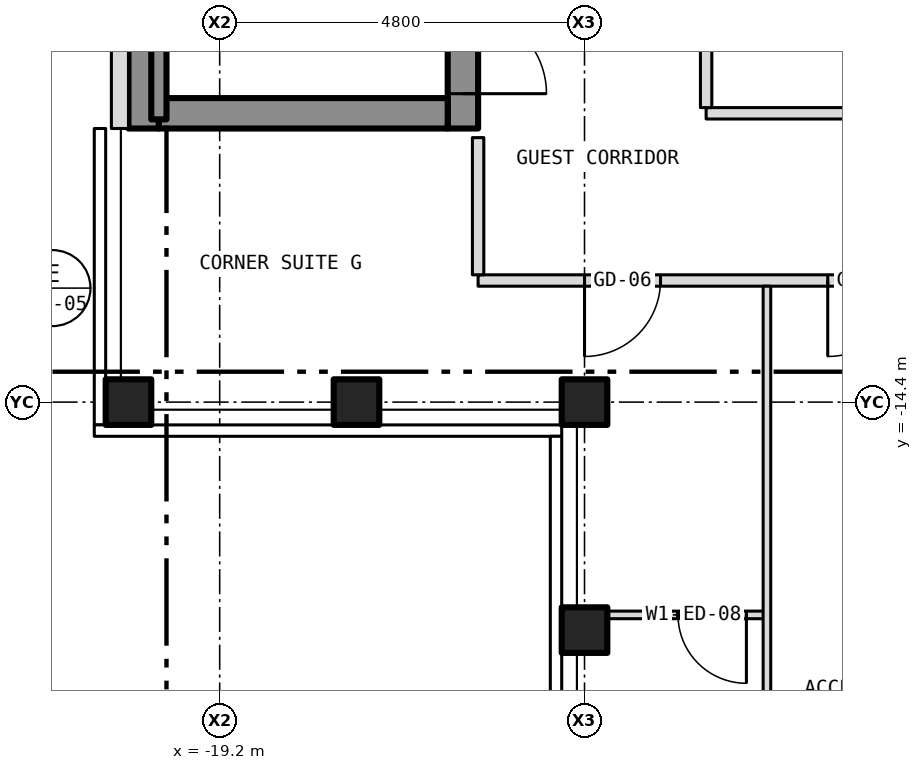
"""IFC4 building model, lengths in metres.
Left out: names, types, materials, properties, quantities, classifications, styles, units other than length and angle.
Written with IfcOpenShell. Run it as: python <this file> out.ifc"""

import sys

from ifc_helpers import new_model, si_unit, direction, frame, frame_2d, origin, origin_2d, place, context, subcontext, project, spatial, rectangle, hollow_rectangle, extrude, element, fill, save


model = new_model("IFC4")
c1 = context("Model", 3, precision=1e-05, world=origin(), true_north=direction((0.0, 1.0)))
c2 = subcontext(c1, "Body", "Model", "MODEL_VIEW")
j1 = project(units=[si_unit("LENGTHUNIT", "METRE"), si_unit("PLANEANGLEUNIT", "RADIAN")], contexts=[c1])
p1 = place(None, origin())
s1 = spatial("IfcSite", under=j1, at=p1, CompositionType="ELEMENT")
p2 = place(p1, origin())
s2 = spatial("IfcBuilding", under=s1, at=p2, CompositionType="ELEMENT")
p3 = place(p2, frame((0.0, 0.0, 241.0)))
s3 = spatial("IfcBuildingStorey", under=s2, at=p3, CompositionType="ELEMENT", Elevation=241.0)
for number, where, z_axis, x_axis in (
    (1, (-20.4, -14.4, -0.15), (0.0, 0.0, 1.0), (1.0, 0.0, 0.0)),
    (2, (-14.4, -14.4, -0.15), (0.0, 0.0, 1.0), (1.0, 0.0, 0.0)),
    (3, (-14.4, -17.4, -0.15), (0.0, 0.0, 1.0), (1.0, 0.0, 0.0)),
    (4, (-17.4, -14.4, -0.15), (0.0, 0.0, 1.0), (1.0, 0.0, 0.0)),
):
    element("IfcColumn", number, at=place(p3, frame(where, z_axis=z_axis, x_axis=x_axis)), inside=s3, PredefinedType="COLUMN", context=c2, shape_type="SweptSolid", body=[
        extrude(hollow_rectangle(XDim=0.6, YDim=0.6, WallThickness=0.03, at=origin_2d()), origin(), (0.0, 0.0, 1.0), 3.5),
    ])
p4 = place(p3, frame((-16.0, -10.8, 0.0), z_axis=(0.0, 0.0, 1.0), x_axis=(0.0, 1.0, 0.0)))
e5 = element("IfcWall", 5, at=p4, inside=s3, PredefinedType="SHEAR", context=c2, shape_type="SweptSolid", body=[
    extrude(rectangle(XDim=21.6, YDim=0.4, at=frame_2d((10.8, 0.0))), origin(), (0.0, 0.0, 1.0), 3.25),
])
p5 = place(p4, frame((9.4, 0.0, 0.0)))
e6 = element("IfcOpeningElement", 6, at=p5, cuts=e5, PredefinedType="OPENING", context=c2, shape_type="SweptSolid", body=[
    extrude(rectangle(XDim=1.1, YDim=2.1, at=frame_2d((0.55, 1.05))), frame((0.0, 0.212, 0.0), z_axis=(0.0, -1.0, 0.0), x_axis=(1.0, 0.0, 0.0)), (0.0, 0.0, 1.0), 0.424),
])
p6 = place(p4, frame((11.5, 0.0, 0.0)))
e7 = element("IfcOpeningElement", 7, at=p6, cuts=e5, PredefinedType="OPENING", context=c2, shape_type="SweptSolid", body=[
    extrude(rectangle(XDim=1.1, YDim=2.1, at=frame_2d((0.55, 1.05))), frame((0.0, 0.212, 0.0), z_axis=(0.0, -1.0, 0.0), x_axis=(1.0, 0.0, 0.0)), (0.0, 0.0, 1.0), 0.424),
])
p7 = place(p4, frame((13.6, 0.0, 0.0)))
e8 = element("IfcOpeningElement", 8, at=p7, cuts=e5, PredefinedType="OPENING", context=c2, shape_type="SweptSolid", body=[
    extrude(rectangle(XDim=1.1, YDim=2.1, at=frame_2d((0.55, 1.05))), frame((0.0, 0.212, 0.0), z_axis=(0.0, -1.0, 0.0), x_axis=(1.0, 0.0, 0.0)), (0.0, 0.0, 1.0), 0.424),
])
p8 = place(p4, frame((15.7, 0.0, 0.0)))
e9 = element("IfcOpeningElement", 9, at=p8, cuts=e5, PredefinedType="OPENING", context=c2, shape_type="SweptSolid", body=[
    extrude(rectangle(XDim=1.1, YDim=2.1, at=frame_2d((0.55, 1.05))), frame((0.0, 0.212, 0.0), z_axis=(0.0, -1.0, 0.0), x_axis=(1.0, 0.0, 0.0)), (0.0, 0.0, 1.0), 0.424),
])
p9 = place(p4, frame((17.8, 0.0, 0.0)))
e10 = element("IfcOpeningElement", 10, at=p9, cuts=e5, PredefinedType="OPENING", context=c2, shape_type="SweptSolid", body=[
    extrude(rectangle(XDim=1.1, YDim=2.1, at=frame_2d((0.55, 1.05))), frame((0.0, 0.212, 0.0), z_axis=(0.0, -1.0, 0.0), x_axis=(1.0, 0.0, 0.0)), (0.0, 0.0, 1.0), 0.424),
])
p10 = place(p4, frame((0.458, 0.0, 0.0)))
e11 = element("IfcOpeningElement", 11, at=p10, cuts=e5, PredefinedType="OPENING", context=c2, shape_type="SweptSolid", body=[
    extrude(rectangle(XDim=1.1, YDim=2.1, at=frame_2d((0.55, 1.05))), frame((0.0, 0.212, 0.0), z_axis=(0.0, -1.0, 0.0), x_axis=(1.0, 0.0, 0.0)), (0.0, 0.0, 1.0), 0.424),
])
p11 = place(p4, frame((7.5, 0.0, 0.0)))
e12 = element("IfcOpeningElement", 12, at=p11, cuts=e5, PredefinedType="OPENING", context=c2, shape_type="SweptSolid", body=[
    extrude(rectangle(XDim=1.1, YDim=2.1, at=frame_2d((0.55, 1.05))), frame((0.0, 0.212, 0.0), z_axis=(0.0, -1.0, 0.0), x_axis=(1.0, 0.0, 0.0)), (0.0, 0.0, 1.0), 0.424),
])
p12 = place(p4, frame((20.0, 0.0, 0.0)))
e13 = element("IfcOpeningElement", 13, at=p12, cuts=e5, PredefinedType="OPENING", context=c2, shape_type="SweptSolid", body=[
    extrude(rectangle(XDim=0.9, YDim=2.1, at=frame_2d((0.45, 1.05))), frame((0.0, 0.212, 0.0), z_axis=(0.0, -1.0, 0.0), x_axis=(1.0, 0.0, 0.0)), (0.0, 0.0, 1.0), 0.424),
])
p13 = place(p3, frame((-20.2, -10.8, 0.0), z_axis=(0.0, 0.0, 1.0), x_axis=(0.0, 1.0, 0.0)))
e14 = element("IfcWall", 14, at=p13, inside=s3, PredefinedType="SHEAR", context=c2, shape_type="SweptSolid", body=[
    extrude(rectangle(XDim=21.6, YDim=0.4, at=frame_2d((10.8, 0.0))), origin(), (0.0, 0.0, 1.0), 3.25),
])
p14 = place(p3, frame((-20.0, -10.6, 0.0), z_axis=(0.0, 0.0, 1.0), x_axis=(1.0, 0.0, 0.0)))
e15 = element("IfcWall", 15, at=p14, inside=s3, PredefinedType="SHEAR", context=c2, shape_type="SweptSolid", body=[
    extrude(rectangle(XDim=3.8, YDim=0.4, at=frame_2d((1.9, 0.0))), origin(), (0.0, 0.0, 1.0), 3.25),
])
p15 = place(p3, frame((-20.512, 10.8, 0.0), z_axis=(0.0, 0.0, 1.0), x_axis=(0.0, -1.0, 0.0)))
e16 = element("IfcWall", 16, at=p15, inside=s3, PredefinedType="SOLIDWALL", context=c2, shape_type="SweptSolid", body=[
    extrude(rectangle(XDim=21.6, YDim=0.225, at=frame_2d((10.8, 0.0))), origin(), (0.0, 0.0, 1.0), 3.5),
])
p16 = place(p15, frame((18.05, 0.0, 1.0)))
e17 = element("IfcOpeningElement", 17, at=p16, cuts=e16, PredefinedType="OPENING", context=c2, shape_type="SweptSolid", body=[
    extrude(rectangle(XDim=0.6, YDim=1.5, at=frame_2d((0.3, 0.75))), frame((0.0, 0.125, 0.0), z_axis=(0.0, -1.0, 0.0), x_axis=(1.0, 0.0, 0.0)), (0.0, 0.0, 1.0), 0.249),
])
p17 = place(p3, frame((-14.28, -17.2, 0.0), z_axis=(0.0, 0.0, 1.0), x_axis=(1.0, 0.0, 0.0)))
e18 = element("IfcWall", 18, at=p17, inside=s3, PredefinedType="PARTITIONING", context=c2, shape_type="SweptSolid", body=[
    extrude(rectangle(XDim=2.28, YDim=0.1, at=frame_2d((1.14, 0.0))), origin(), (0.0, 0.0, 1.0), 3.35),
])
p18 = place(p17, frame((1.11, 0.0, 0.0)))
e19 = element("IfcOpeningElement", 19, at=p18, cuts=e18, PredefinedType="OPENING", context=c2, shape_type="SweptSolid", body=[
    extrude(rectangle(XDim=0.9, YDim=2.1, at=frame_2d((0.45, 1.05))), frame((0.0, 0.062, 0.0), z_axis=(0.0, -1.0, 0.0), x_axis=(1.0, 0.0, 0.0)), (0.0, 0.0, 1.0), 0.124),
])
p19 = place(p3, frame((-15.8, -12.8, 0.0), z_axis=(0.0, 0.0, 1.0), x_axis=(1.0, 0.0, 0.0)))
e20 = element("IfcWall", 20, at=p19, inside=s3, PredefinedType="PARTITIONING", context=c2, shape_type="SweptSolid", body=[
    extrude(rectangle(XDim=31.6, YDim=0.15, at=frame_2d((15.8, 0.0))), origin(), (0.0, 0.0, 1.0), 3.35),
])
p20 = place(p19, frame((4.6, 0.0, 0.0)))
e21 = element("IfcOpeningElement", 21, at=p20, cuts=e20, PredefinedType="OPENING", context=c2, shape_type="SweptSolid", body=[
    extrude(rectangle(XDim=1.0, YDim=2.1, at=frame_2d((0.5, 1.05))), frame((0.0, 0.087, 0.0), z_axis=(0.0, -1.0, 0.0), x_axis=(1.0, 0.0, 0.0)), (0.0, 0.0, 1.0), 0.174),
])
p21 = place(p19, frame((12.8, 0.0, 0.0)))
e22 = element("IfcOpeningElement", 22, at=p21, cuts=e20, PredefinedType="OPENING", context=c2, shape_type="SweptSolid", body=[
    extrude(rectangle(XDim=1.0, YDim=2.1, at=frame_2d((0.5, 1.05))), frame((0.0, 0.087, 0.0), z_axis=(0.0, -1.0, 0.0), x_axis=(1.0, 0.0, 0.0)), (0.0, 0.0, 1.0), 0.174),
])
p22 = place(p19, frame((18.0, 0.0, 0.0)))
e23 = element("IfcOpeningElement", 23, at=p22, cuts=e20, PredefinedType="OPENING", context=c2, shape_type="SweptSolid", body=[
    extrude(rectangle(XDim=1.0, YDim=2.1, at=frame_2d((0.5, 1.05))), frame((0.0, 0.087, 0.0), z_axis=(0.0, -1.0, 0.0), x_axis=(1.0, 0.0, 0.0)), (0.0, 0.0, 1.0), 0.174),
])
p23 = place(p19, frame((1.4, 0.0, 0.0)))
e24 = element("IfcOpeningElement", 24, at=p23, cuts=e20, PredefinedType="OPENING", context=c2, shape_type="SweptSolid", body=[
    extrude(rectangle(XDim=1.0, YDim=2.1, at=frame_2d((0.5, 1.05))), frame((0.0, 0.087, 0.0), z_axis=(0.0, -1.0, 0.0), x_axis=(1.0, 0.0, 0.0)), (0.0, 0.0, 1.0), 0.174),
])
p24 = place(p19, frame((29.2, 0.0, 0.0)))
e25 = element("IfcOpeningElement", 25, at=p24, cuts=e20, PredefinedType="OPENING", context=c2, shape_type="SweptSolid", body=[
    extrude(rectangle(XDim=1.0, YDim=2.1, at=frame_2d((0.5, 1.05))), frame((0.0, 0.087, 0.0), z_axis=(0.0, -1.0, 0.0), x_axis=(1.0, 0.0, 0.0)), (0.0, 0.0, 1.0), 0.174),
])
p25 = place(p3, frame((-12.8, -10.6, 0.0), z_axis=(0.0, 0.0, 1.0), x_axis=(1.0, 0.0, 0.0)))
e26 = element("IfcWall", 26, at=p25, inside=s3, PredefinedType="PARTITIONING", context=c2, shape_type="SweptSolid", body=[
    extrude(rectangle(XDim=20.3, YDim=0.15, at=frame_2d((10.15, 0.0))), origin(), (0.0, 0.0, 1.0), 3.35),
])
p26 = place(p25, frame((11.3, 0.0, 0.0)))
e27 = element("IfcOpeningElement", 27, at=p26, cuts=e26, PredefinedType="OPENING", context=c2, shape_type="SweptSolid", body=[
    extrude(rectangle(XDim=0.9, YDim=2.1, at=frame_2d((0.45, 1.05))), frame((0.0, 0.087, 0.0), z_axis=(0.0, -1.0, 0.0), x_axis=(1.0, 0.0, 0.0)), (0.0, 0.0, 1.0), 0.174),
])
p27 = place(p3, frame((-20.0, -10.68, 0.0), z_axis=(0.0, 0.0, 1.0), x_axis=(0.0, 1.0, 0.0)))
e28 = element("IfcWall", 28, at=p27, inside=s3, PredefinedType="SHEAR", context=c2, shape_type="SweptSolid", body=[
    extrude(rectangle(XDim=6.98, YDim=0.2, at=frame_2d((3.49, 0.0))), origin(), (0.0, 0.0, 1.0), 3.25),
])
p28 = place(p3, frame((-15.8, -12.725, 0.0), z_axis=(0.0, 0.0, 1.0), x_axis=(0.0, 1.0, 0.0)))
e29 = element("IfcWall", 29, at=p28, inside=s3, PredefinedType="PARTITIONING", context=c2, shape_type="SweptSolid", body=[
    extrude(rectangle(XDim=1.805, YDim=0.15, at=frame_2d((0.903, 0.0))), origin(), (0.0, 0.0, 1.0), 3.35),
])
p29 = place(p3, frame((-12.8, -10.525, 0.0), z_axis=(0.0, 0.0, 1.0), x_axis=(0.0, 1.0, 0.0)))
e30 = element("IfcWall", 30, at=p29, inside=s3, PredefinedType="PARTITIONING", context=c2, shape_type="SweptSolid", body=[
    extrude(rectangle(XDim=8.525, YDim=0.15, at=frame_2d((4.262, 0.0))), origin(), (0.0, 0.0, 1.0), 3.35),
])
p30 = place(p29, frame((3.825, 0.0, 0.0)))
e31 = element("IfcOpeningElement", 31, at=p30, cuts=e30, PredefinedType="OPENING", context=c2, shape_type="SweptSolid", body=[
    extrude(rectangle(XDim=0.9, YDim=2.1, at=frame_2d((0.45, 1.05))), frame((0.0, 0.087, 0.0), z_axis=(0.0, -1.0, 0.0), x_axis=(1.0, 0.0, 0.0)), (0.0, 0.0, 1.0), 0.174),
])
p31 = place(p3, frame((-12.0, -20.73, 0.0), z_axis=(0.0, 0.0, 1.0), x_axis=(0.0, 1.0, 0.0)))
e32 = element("IfcWall", 32, at=p31, inside=s3, PredefinedType="PARTITIONING", context=c2, shape_type="SweptSolid", body=[
    extrude(rectangle(XDim=7.855, YDim=0.1, at=frame_2d((3.927, 0.0))), origin(), (0.0, 0.0, 1.0), 3.35),
])
p32 = place(p10, origin())
e33 = element("IfcDoor", 33, at=p32, inside=s3, OperationType="SINGLE_SWING_LEFT", PredefinedType="DOOR", context=c2, shape_type="SweptSolid", body=[
    extrude(rectangle(XDim=1.1, YDim=2.1, at=frame_2d((0.55, 1.05))), frame((0.0, 0.025, 0.0), z_axis=(0.0, -1.0, 0.0), x_axis=(1.0, 0.0, 0.0)), (0.0, 0.0, 1.0), 0.05),
])
fill(e11, e33)
p33 = place(p20, origin())
e34 = element("IfcDoor", 34, at=p33, inside=s3, OperationType="SINGLE_SWING_LEFT", PredefinedType="DOOR", context=c2, shape_type="SweptSolid", body=[
    extrude(rectangle(XDim=1.0, YDim=2.1, at=frame_2d((0.5, 1.05))), frame((0.0, 0.025, 0.0), z_axis=(0.0, -1.0, 0.0), x_axis=(1.0, 0.0, 0.0)), (0.0, 0.0, 1.0), 0.05),
])
fill(e21, e34)
p34 = place(p18, origin())
e35 = element("IfcDoor", 35, at=p34, inside=s3, OperationType="SINGLE_SWING_RIGHT", PredefinedType="DOOR", context=c2, shape_type="SweptSolid", body=[
    extrude(rectangle(XDim=0.9, YDim=2.1, at=frame_2d((0.45, 1.05))), frame((0.0, 0.025, 0.0), z_axis=(0.0, -1.0, 0.0), x_axis=(1.0, 0.0, 0.0)), (0.0, 0.0, 1.0), 0.05),
])
fill(e19, e35)
p35 = place(p23, origin())
e36 = element("IfcDoor", 36, at=p35, inside=s3, OperationType="SINGLE_SWING_LEFT", PredefinedType="DOOR", context=c2, shape_type="SweptSolid", body=[
    extrude(rectangle(XDim=1.0, YDim=2.1, at=frame_2d((0.5, 1.05))), frame((0.0, 0.025, 0.0), z_axis=(0.0, -1.0, 0.0), x_axis=(1.0, 0.0, 0.0)), (0.0, 0.0, 1.0), 0.05),
])
fill(e24, e36)
save(model, sys.argv[1])
